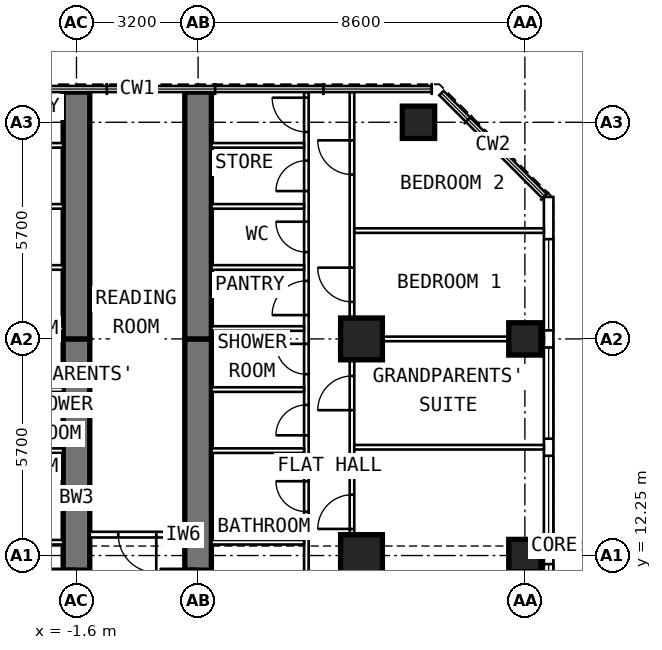
"""IFC4 building model, lengths in metres.
Left out: names, types, materials, properties, quantities, classifications, styles, units other than length and angle.
Written with IfcOpenShell. Run it as: python <this file> out.ifc"""

import sys

from ifc_helpers import new_model, si_unit, direction, frame, frame_2d, origin, origin_2d, place, context, subcontext, project, spatial, rectangle, extrude, element, fill, save


model = new_model("IFC4")
c1 = context("Model", 3, precision=1e-05, world=origin(), true_north=direction((0.0, 1.0)))
c2 = subcontext(c1, "Body", "Model", "MODEL_VIEW")
j1 = project(units=[si_unit("LENGTHUNIT", "METRE"), si_unit("PLANEANGLEUNIT", "RADIAN")], contexts=[c1])
p1 = place(None, origin())
s1 = spatial("IfcSite", under=j1, at=p1, CompositionType="ELEMENT")
p2 = place(p1, origin())
s2 = spatial("IfcBuilding", under=s1, at=p2, CompositionType="ELEMENT")
p3 = place(p2, frame((0.0, 0.0, 249.6)))
s3 = spatial("IfcBuildingStorey", under=s2, at=p3, CompositionType="ELEMENT", Elevation=249.6)
for number, where, z_axis, x_axis in (
    (1, (10.2, 12.25, 0.0), (0.0, 0.0, 1.0), (0.0, 1.0, 0.0)),
    (2, (10.2, 17.95, 0.0), (0.0, 0.0, 1.0), (0.0, 1.0, 0.0)),
    (3, (7.4, 23.65, 0.0), (0.0, 0.0, 1.0), (0.0, 1.0, 0.0)),
):
    element("IfcColumn", number, at=place(p3, frame(where, z_axis=z_axis, x_axis=x_axis)), inside=s3, PredefinedType="COLUMN", context=c2, shape_type="SweptSolid", body=[
        extrude(rectangle(XDim=0.85, YDim=0.85, at=origin_2d()), origin(), (0.0, 0.0, 1.0), 3.6),
    ])
for number, where, z_axis, x_axis in (
    (4, (5.9, 12.25, 0.0), (0.0, 0.0, 1.0), (0.0, 1.0, 0.0)),
    (5, (5.9, 17.95, 0.0), (0.0, 0.0, 1.0), (0.0, 1.0, 0.0)),
):
    element("IfcColumn", number, at=place(p3, frame(where, z_axis=z_axis, x_axis=x_axis)), inside=s3, PredefinedType="COLUMN", context=c2, shape_type="SweptSolid", body=[
        extrude(rectangle(XDim=1.1, YDim=1.1, at=origin_2d()), origin(), (0.0, 0.0, 1.0), 3.6),
    ])
p4 = place(p3, frame((-1.6, 9.6, 0.0), z_axis=(0.0, 0.0, 1.0), x_axis=(0.0, 1.0, 0.0)))
e6 = element("IfcWall", 6, at=p4, inside=s3, PredefinedType="SHEAR", context=c2, shape_type="SweptSolid", body=[
    extrude(rectangle(XDim=8.35, YDim=0.7, at=frame_2d((4.175, 0.0))), origin(), (0.0, 0.0, 1.0), 3.6),
])
p5 = place(p4, frame((1.3, 0.0, 0.0)))
e7 = element("IfcOpeningElement", 7, at=p5, cuts=e6, PredefinedType="OPENING", context=c2, shape_type="SweptSolid", body=[
    extrude(rectangle(XDim=1.0, YDim=2.1, at=frame_2d((0.5, 1.05))), frame((0.0, 0.362, 0.0), z_axis=(0.0, -1.0, 0.0), x_axis=(1.0, 0.0, 0.0)), (0.0, 0.0, 1.0), 0.724),
])
p6 = place(p3, frame((-1.6, 17.95, 0.0), z_axis=(0.0, 0.0, 1.0), x_axis=(0.0, 1.0, 0.0)))
e8 = element("IfcWall", 8, at=p6, inside=s3, PredefinedType="SHEAR", context=c2, shape_type="SweptSolid", body=[
    extrude(rectangle(XDim=6.495, YDim=0.7, at=frame_2d((3.248, 0.0))), origin(), (0.0, 0.0, 1.0), 3.6),
])
p7 = place(p3, frame((1.6, 9.6, 0.0), z_axis=(0.0, 0.0, 1.0), x_axis=(0.0, 1.0, 0.0)))
e9 = element("IfcWall", 9, at=p7, inside=s3, PredefinedType="SHEAR", context=c2, shape_type="SweptSolid", body=[
    extrude(rectangle(XDim=8.35, YDim=0.7, at=frame_2d((4.175, 0.0))), origin(), (0.0, 0.0, 1.0), 3.6),
])
p8 = place(p7, frame((1.3, 0.0, 0.0)))
e10 = element("IfcOpeningElement", 10, at=p8, cuts=e9, PredefinedType="OPENING", context=c2, shape_type="SweptSolid", body=[
    extrude(rectangle(XDim=1.0, YDim=2.1, at=frame_2d((0.5, 1.05))), frame((0.0, 0.362, 0.0), z_axis=(0.0, -1.0, 0.0), x_axis=(1.0, 0.0, 0.0)), (0.0, 0.0, 1.0), 0.724),
])
p9 = place(p3, frame((1.6, 17.95, 0.0), z_axis=(0.0, 0.0, 1.0), x_axis=(0.0, 1.0, 0.0)))
e11 = element("IfcWall", 11, at=p9, inside=s3, PredefinedType="SHEAR", context=c2, shape_type="SweptSolid", body=[
    extrude(rectangle(XDim=6.495, YDim=0.7, at=frame_2d((3.248, 0.0))), origin(), (0.0, 0.0, 1.0), 3.6),
])
p10 = place(p3, frame((10.825, 6.409, 0.0), z_axis=(0.0, 0.0, 1.0), x_axis=(0.0, 1.0, 0.0)))
e12 = element("IfcWall", 12, at=p10, inside=s3, PredefinedType="SOLIDWALL", context=c2, shape_type="SweptSolid", body=[
    extrude(rectangle(XDim=15.276, YDim=0.25, at=frame_2d((7.638, 0.0))), origin(), (0.0, 0.0, 1.0), 3.35),
])
p11 = place(p10, frame((0.366, 0.0, 0.8)))
e13 = element("IfcOpeningElement", 13, at=p11, cuts=e12, PredefinedType="OPENING", context=c2, shape_type="SweptSolid", body=[
    extrude(rectangle(XDim=2.4, YDim=1.8, at=frame_2d((1.2, 0.9))), frame((0.0, 0.137, 0.0), z_axis=(0.0, -1.0, 0.0), x_axis=(1.0, 0.0, 0.0)), (0.0, 0.0, 1.0), 0.274),
])
p12 = place(p10, frame((3.216, 0.0, 0.8)))
e14 = element("IfcOpeningElement", 14, at=p12, cuts=e12, PredefinedType="OPENING", context=c2, shape_type="SweptSolid", body=[
    extrude(rectangle(XDim=2.4, YDim=1.8, at=frame_2d((1.2, 0.9))), frame((0.0, 0.137, 0.0), z_axis=(0.0, -1.0, 0.0), x_axis=(1.0, 0.0, 0.0)), (0.0, 0.0, 1.0), 0.274),
])
p13 = place(p10, frame((6.066, 0.0, 0.8)))
e15 = element("IfcOpeningElement", 15, at=p13, cuts=e12, PredefinedType="OPENING", context=c2, shape_type="SweptSolid", body=[
    extrude(rectangle(XDim=2.4, YDim=1.8, at=frame_2d((1.2, 0.9))), frame((0.0, 0.137, 0.0), z_axis=(0.0, -1.0, 0.0), x_axis=(1.0, 0.0, 0.0)), (0.0, 0.0, 1.0), 0.274),
])
p14 = place(p10, frame((8.916, 0.0, 0.8)))
e16 = element("IfcOpeningElement", 16, at=p14, cuts=e12, PredefinedType="OPENING", context=c2, shape_type="SweptSolid", body=[
    extrude(rectangle(XDim=2.4, YDim=1.8, at=frame_2d((1.2, 0.9))), frame((0.0, 0.137, 0.0), z_axis=(0.0, -1.0, 0.0), x_axis=(1.0, 0.0, 0.0)), (0.0, 0.0, 1.0), 0.274),
])
p15 = place(p10, frame((11.766, 0.0, 0.8)))
e17 = element("IfcOpeningElement", 17, at=p15, cuts=e12, PredefinedType="OPENING", context=c2, shape_type="SweptSolid", body=[
    extrude(rectangle(XDim=2.4, YDim=1.8, at=frame_2d((1.2, 0.9))), frame((0.0, 0.137, 0.0), z_axis=(0.0, -1.0, 0.0), x_axis=(1.0, 0.0, 0.0)), (0.0, 0.0, 1.0), 0.274),
])
p16 = place(p3, frame((-1.95, 12.6, 0.0), z_axis=(0.0, 0.0, 1.0), x_axis=(-1.0, 0.0, 0.0)))
e18 = element("IfcWall", 18, at=p16, inside=s3, PredefinedType="PARTITIONING", context=c2, shape_type="SweptSolid", body=[
    extrude(rectangle(XDim=2.44, YDim=0.12, at=frame_2d((1.22, 0.0))), origin(), (0.0, 0.0, 1.0), 2.45),
])
for number, where, z_axis, x_axis in (
    (19, (-1.95, 15.01, 0.0), (0.0, 0.0, 1.0), (-1.0, 0.0, 0.0)),
    (20, (-1.95, 16.617, 0.0), (0.0, 0.0, 1.0), (-1.0, 0.0, 0.0)),
):
    element("IfcWall", number, at=place(p3, frame(where, z_axis=z_axis, x_axis=x_axis)), inside=s3, PredefinedType="PARTITIONING", context=c2, shape_type="SweptSolid", body=[
        extrude(rectangle(XDim=2.44, YDim=0.12, at=frame_2d((1.22, 0.0))), origin(), (0.0, 0.0, 1.0), 3.35),
    ])
p17 = place(p3, frame((-1.95, 18.223, 0.0), z_axis=(0.0, 0.0, 1.0), x_axis=(-1.0, 0.0, 0.0)))
e21 = element("IfcWall", 21, at=p17, inside=s3, PredefinedType="PARTITIONING", context=c2, shape_type="SweptSolid", body=[
    extrude(rectangle(XDim=2.44, YDim=0.12, at=frame_2d((1.22, 0.0))), origin(), (0.0, 0.0, 1.0), 2.45),
])
for number, where, z_axis, x_axis in (
    (22, (-1.95, 19.83, 0.0), (0.0, 0.0, 1.0), (-1.0, 0.0, 0.0)),
    (23, (-1.95, 21.437, 0.0), (0.0, 0.0, 1.0), (-1.0, 0.0, 0.0)),
    (24, (-1.95, 23.043, 0.0), (0.0, 0.0, 1.0), (-1.0, 0.0, 0.0)),
):
    element("IfcWall", number, at=place(p3, frame(where, z_axis=z_axis, x_axis=x_axis)), inside=s3, PredefinedType="PARTITIONING", context=c2, shape_type="SweptSolid", body=[
        extrude(rectangle(XDim=2.44, YDim=0.12, at=frame_2d((1.22, 0.0))), origin(), (0.0, 0.0, 1.0), 3.35),
    ])
p18 = place(p3, frame((4.45, 9.9, 0.0), z_axis=(0.0, 0.0, 1.0), x_axis=(0.0, 1.0, 0.0)))
e25 = element("IfcWall", 25, at=p18, inside=s3, PredefinedType="PARTITIONING", context=c2, shape_type="SweptSolid", body=[
    extrude(rectangle(XDim=14.545, YDim=0.12, at=frame_2d((7.272, 0.0))), origin(), (0.0, 0.0, 1.0), 3.35),
])
p19 = place(p18, frame((0.95, 0.0, 0.0)))
e26 = element("IfcOpeningElement", 26, at=p19, cuts=e25, PredefinedType="OPENING", context=c2, shape_type="SweptSolid", body=[
    extrude(rectangle(XDim=0.9, YDim=2.1, at=frame_2d((0.45, 1.05))), frame((0.0, 0.072, 0.0), z_axis=(0.0, -1.0, 0.0), x_axis=(1.0, 0.0, 0.0)), (0.0, 0.0, 1.0), 0.144),
])
p20 = place(p18, frame((3.505, 0.0, 0.0)))
e27 = element("IfcOpeningElement", 27, at=p20, cuts=e25, PredefinedType="OPENING", context=c2, shape_type="SweptSolid", body=[
    extrude(rectangle(XDim=0.8, YDim=2.1, at=frame_2d((0.4, 1.05))), frame((0.0, 0.072, 0.0), z_axis=(0.0, -1.0, 0.0), x_axis=(1.0, 0.0, 0.0)), (0.0, 0.0, 1.0), 0.144),
])
p21 = place(p18, frame((5.513, 0.0, 0.0)))
e28 = element("IfcOpeningElement", 28, at=p21, cuts=e25, PredefinedType="OPENING", context=c2, shape_type="SweptSolid", body=[
    extrude(rectangle(XDim=0.8, YDim=2.1, at=frame_2d((0.4, 1.05))), frame((0.0, 0.072, 0.0), z_axis=(0.0, -1.0, 0.0), x_axis=(1.0, 0.0, 0.0)), (0.0, 0.0, 1.0), 0.144),
])
p22 = place(p18, frame((7.12, 0.0, 0.0)))
e29 = element("IfcOpeningElement", 29, at=p22, cuts=e25, PredefinedType="OPENING", context=c2, shape_type="SweptSolid", body=[
    extrude(rectangle(XDim=0.8, YDim=2.1, at=frame_2d((0.4, 1.05))), frame((0.0, 0.072, 0.0), z_axis=(0.0, -1.0, 0.0), x_axis=(1.0, 0.0, 0.0)), (0.0, 0.0, 1.0), 0.144),
])
p23 = place(p18, frame((8.677, 0.0, 0.0)))
e30 = element("IfcOpeningElement", 30, at=p23, cuts=e25, PredefinedType="OPENING", context=c2, shape_type="SweptSolid", body=[
    extrude(rectangle(XDim=0.9, YDim=2.1, at=frame_2d((0.45, 1.05))), frame((0.0, 0.072, 0.0), z_axis=(0.0, -1.0, 0.0), x_axis=(1.0, 0.0, 0.0)), (0.0, 0.0, 1.0), 0.144),
])
p24 = place(p18, frame((10.333, 0.0, 0.0)))
e31 = element("IfcOpeningElement", 31, at=p24, cuts=e25, PredefinedType="OPENING", context=c2, shape_type="SweptSolid", body=[
    extrude(rectangle(XDim=0.8, YDim=2.1, at=frame_2d((0.4, 1.05))), frame((0.0, 0.072, 0.0), z_axis=(0.0, -1.0, 0.0), x_axis=(1.0, 0.0, 0.0)), (0.0, 0.0, 1.0), 0.144),
])
p25 = place(p18, frame((11.94, 0.0, 0.0)))
e32 = element("IfcOpeningElement", 32, at=p25, cuts=e25, PredefinedType="OPENING", context=c2, shape_type="SweptSolid", body=[
    extrude(rectangle(XDim=0.8, YDim=2.1, at=frame_2d((0.4, 1.05))), frame((0.0, 0.072, 0.0), z_axis=(0.0, -1.0, 0.0), x_axis=(1.0, 0.0, 0.0)), (0.0, 0.0, 1.0), 0.144),
])
p26 = place(p18, frame((13.497, 0.0, 0.0)))
e33 = element("IfcOpeningElement", 33, at=p26, cuts=e25, PredefinedType="OPENING", context=c2, shape_type="SweptSolid", body=[
    extrude(rectangle(XDim=0.9, YDim=2.1, at=frame_2d((0.45, 1.05))), frame((0.0, 0.072, 0.0), z_axis=(0.0, -1.0, 0.0), x_axis=(1.0, 0.0, 0.0)), (0.0, 0.0, 1.0), 0.144),
])
p27 = place(p3, frame((5.65, 9.6, 0.0), z_axis=(0.0, 0.0, 1.0), x_axis=(0.0, 1.0, 0.0)))
e34 = element("IfcWall", 34, at=p27, inside=s3, PredefinedType="PARTITIONING", context=c2, shape_type="SweptSolid", body=[
    extrude(rectangle(XDim=14.845, YDim=0.12, at=frame_2d((7.422, 0.0))), origin(), (0.0, 0.0, 1.0), 3.35),
])
p28 = place(p27, frame((3.35, 0.0, 0.0)))
e35 = element("IfcOpeningElement", 35, at=p28, cuts=e34, PredefinedType="OPENING", context=c2, shape_type="SweptSolid", body=[
    extrude(rectangle(XDim=0.9, YDim=2.1, at=frame_2d((0.45, 1.05))), frame((0.0, 0.072, 0.0), z_axis=(0.0, -1.0, 0.0), x_axis=(1.0, 0.0, 0.0)), (0.0, 0.0, 1.0), 0.144),
])
p29 = place(p27, frame((6.475, 0.0, 0.0)))
e36 = element("IfcOpeningElement", 36, at=p29, cuts=e34, PredefinedType="OPENING", context=c2, shape_type="SweptSolid", body=[
    extrude(rectangle(XDim=0.9, YDim=2.1, at=frame_2d((0.45, 1.05))), frame((0.0, 0.072, 0.0), z_axis=(0.0, -1.0, 0.0), x_axis=(1.0, 0.0, 0.0)), (0.0, 0.0, 1.0), 0.144),
])
p30 = place(p27, frame((9.325, 0.0, 0.0)))
e37 = element("IfcOpeningElement", 37, at=p30, cuts=e34, PredefinedType="OPENING", context=c2, shape_type="SweptSolid", body=[
    extrude(rectangle(XDim=0.9, YDim=2.1, at=frame_2d((0.45, 1.05))), frame((0.0, 0.072, 0.0), z_axis=(0.0, -1.0, 0.0), x_axis=(1.0, 0.0, 0.0)), (0.0, 0.0, 1.0), 0.144),
])
p31 = place(p27, frame((12.675, 0.0, 0.0)))
e38 = element("IfcOpeningElement", 38, at=p31, cuts=e34, PredefinedType="OPENING", context=c2, shape_type="SweptSolid", body=[
    extrude(rectangle(XDim=0.9, YDim=2.1, at=frame_2d((0.45, 1.05))), frame((0.0, 0.072, 0.0), z_axis=(0.0, -1.0, 0.0), x_axis=(1.0, 0.0, 0.0)), (0.0, 0.0, 1.0), 0.144),
])
p32 = place(p3, frame((5.71, 15.1, 0.0), z_axis=(0.0, 0.0, 1.0), x_axis=(1.0, 0.0, 0.0)))
e39 = element("IfcWall", 39, at=p32, inside=s3, PredefinedType="PARTITIONING", context=c2, shape_type="SweptSolid", body=[
    extrude(rectangle(XDim=4.99, YDim=0.12, at=frame_2d((2.495, 0.0))), origin(), (0.0, 0.0, 1.0), 3.35),
])
p33 = place(p3, frame((5.71, 17.95, 0.0), z_axis=(0.0, 0.0, 1.0), x_axis=(1.0, 0.0, 0.0)))
e40 = element("IfcWall", 40, at=p33, inside=s3, PredefinedType="PARTITIONING", context=c2, shape_type="SweptSolid", body=[
    extrude(rectangle(XDim=4.99, YDim=0.12, at=frame_2d((2.495, 0.0))), origin(), (0.0, 0.0, 1.0), 2.45),
])
p34 = place(p3, frame((5.71, 20.8, 0.0), z_axis=(0.0, 0.0, 1.0), x_axis=(1.0, 0.0, 0.0)))
e41 = element("IfcWall", 41, at=p34, inside=s3, PredefinedType="PARTITIONING", context=c2, shape_type="SweptSolid", body=[
    extrude(rectangle(XDim=4.99, YDim=0.12, at=frame_2d((2.495, 0.0))), origin(), (0.0, 0.0, 1.0), 3.35),
])
p35 = place(p3, frame((1.95, 12.6, 0.0), z_axis=(0.0, 0.0, 1.0), x_axis=(1.0, 0.0, 0.0)))
e42 = element("IfcWall", 42, at=p35, inside=s3, PredefinedType="PARTITIONING", context=c2, shape_type="SweptSolid", body=[
    extrude(rectangle(XDim=2.44, YDim=0.12, at=frame_2d((1.22, 0.0))), origin(), (0.0, 0.0, 1.0), 2.45),
])
for number, where, z_axis, x_axis in (
    (43, (1.95, 15.01, 0.0), (0.0, 0.0, 1.0), (1.0, 0.0, 0.0)),
    (44, (1.95, 16.617, 0.0), (0.0, 0.0, 1.0), (1.0, 0.0, 0.0)),
):
    element("IfcWall", number, at=place(p3, frame(where, z_axis=z_axis, x_axis=x_axis)), inside=s3, PredefinedType="PARTITIONING", context=c2, shape_type="SweptSolid", body=[
        extrude(rectangle(XDim=2.44, YDim=0.12, at=frame_2d((1.22, 0.0))), origin(), (0.0, 0.0, 1.0), 3.35),
    ])
p36 = place(p3, frame((1.95, 18.223, 0.0), z_axis=(0.0, 0.0, 1.0), x_axis=(1.0, 0.0, 0.0)))
e45 = element("IfcWall", 45, at=p36, inside=s3, PredefinedType="PARTITIONING", context=c2, shape_type="SweptSolid", body=[
    extrude(rectangle(XDim=2.44, YDim=0.12, at=frame_2d((1.22, 0.0))), origin(), (0.0, 0.0, 1.0), 2.45),
])
for number, where, z_axis, x_axis in (
    (46, (1.95, 19.83, 0.0), (0.0, 0.0, 1.0), (1.0, 0.0, 0.0)),
    (47, (1.95, 21.437, 0.0), (0.0, 0.0, 1.0), (1.0, 0.0, 0.0)),
    (48, (1.95, 23.043, 0.0), (0.0, 0.0, 1.0), (1.0, 0.0, 0.0)),
):
    element("IfcWall", number, at=place(p3, frame(where, z_axis=z_axis, x_axis=x_axis)), inside=s3, PredefinedType="PARTITIONING", context=c2, shape_type="SweptSolid", body=[
        extrude(rectangle(XDim=2.44, YDim=0.12, at=frame_2d((1.22, 0.0))), origin(), (0.0, 0.0, 1.0), 3.35),
    ])
p37 = place(p3, frame((1.25, 12.8, 0.0), z_axis=(0.0, 0.0, 1.0), x_axis=(-1.0, 0.0, 0.0)))
e49 = element("IfcWall", 49, at=p37, inside=s3, PredefinedType="PARTITIONING", context=c2, shape_type="SweptSolid", body=[
    extrude(rectangle(XDim=2.5, YDim=0.15, at=frame_2d((1.25, 0.0))), origin(), (0.0, 0.0, 1.0), 3.35),
])
p38 = place(p37, frame((0.75, 0.0, 0.0)))
e50 = element("IfcOpeningElement", 50, at=p38, cuts=e49, PredefinedType="OPENING", context=c2, shape_type="SweptSolid", body=[
    extrude(rectangle(XDim=1.0, YDim=2.1, at=frame_2d((0.5, 1.05))), frame((0.0, 0.087, 0.0), z_axis=(0.0, -1.0, 0.0), x_axis=(1.0, 0.0, 0.0)), (0.0, 0.0, 1.0), 0.174),
])
p39 = place(p12, origin())
e51 = element("IfcWindow", 51, at=p39, inside=s3, PartitioningType="SINGLE_PANEL", PredefinedType="WINDOW", context=c2, shape_type="SweptSolid", body=[
    extrude(rectangle(XDim=2.4, YDim=1.8, at=frame_2d((1.2, 0.9))), frame((0.0, 0.03, 0.0), z_axis=(0.0, -1.0, 0.0), x_axis=(1.0, 0.0, 0.0)), (0.0, 0.0, 1.0), 0.06),
])
fill(e14, e51)
p40 = place(p13, origin())
e52 = element("IfcWindow", 52, at=p40, inside=s3, PartitioningType="SINGLE_PANEL", PredefinedType="WINDOW", context=c2, shape_type="SweptSolid", body=[
    extrude(rectangle(XDim=2.4, YDim=1.8, at=frame_2d((1.2, 0.9))), frame((0.0, 0.03, 0.0), z_axis=(0.0, -1.0, 0.0), x_axis=(1.0, 0.0, 0.0)), (0.0, 0.0, 1.0), 0.06),
])
fill(e15, e52)
p41 = place(p14, origin())
e53 = element("IfcWindow", 53, at=p41, inside=s3, PartitioningType="SINGLE_PANEL", PredefinedType="WINDOW", context=c2, shape_type="SweptSolid", body=[
    extrude(rectangle(XDim=2.4, YDim=1.8, at=frame_2d((1.2, 0.9))), frame((0.0, 0.03, 0.0), z_axis=(0.0, -1.0, 0.0), x_axis=(1.0, 0.0, 0.0)), (0.0, 0.0, 1.0), 0.06),
])
fill(e16, e53)
p42 = place(p15, origin())
e54 = element("IfcWindow", 54, at=p42, inside=s3, PartitioningType="SINGLE_PANEL", PredefinedType="WINDOW", context=c2, shape_type="SweptSolid", body=[
    extrude(rectangle(XDim=2.4, YDim=1.8, at=frame_2d((1.2, 0.9))), frame((0.0, 0.03, 0.0), z_axis=(0.0, -1.0, 0.0), x_axis=(1.0, 0.0, 0.0)), (0.0, 0.0, 1.0), 0.06),
])
fill(e17, e54)
p43 = place(p5, origin())
e55 = element("IfcDoor", 55, at=p43, inside=s3, OperationType="SINGLE_SWING_RIGHT", PredefinedType="DOOR", context=c2, shape_type="SweptSolid", body=[
    extrude(rectangle(XDim=1.0, YDim=2.1, at=frame_2d((0.5, 1.05))), frame((0.0, 0.1, 0.0), z_axis=(0.0, -1.0, 0.0), x_axis=(1.0, 0.0, 0.0)), (0.0, 0.0, 1.0), 0.2),
])
fill(e7, e55)
p44 = place(p8, origin())
e56 = element("IfcDoor", 56, at=p44, inside=s3, OperationType="SINGLE_SWING_RIGHT", PredefinedType="DOOR", context=c2, shape_type="SweptSolid", body=[
    extrude(rectangle(XDim=1.0, YDim=2.1, at=frame_2d((0.5, 1.05))), frame((0.0, 0.1, 0.0), z_axis=(0.0, -1.0, 0.0), x_axis=(1.0, 0.0, 0.0)), (0.0, 0.0, 1.0), 0.2),
])
fill(e10, e56)
p45 = place(p28, origin())
e57 = element("IfcDoor", 57, at=p45, inside=s3, OperationType="SINGLE_SWING_LEFT", PredefinedType="DOOR", context=c2, shape_type="SweptSolid", body=[
    extrude(rectangle(XDim=0.9, YDim=2.1, at=frame_2d((0.45, 1.05))), frame((0.0, 0.025, 0.0), z_axis=(0.0, -1.0, 0.0), x_axis=(1.0, 0.0, 0.0)), (0.0, 0.0, 1.0), 0.05),
])
fill(e35, e57)
p46 = place(p29, origin())
e58 = element("IfcDoor", 58, at=p46, inside=s3, OperationType="SINGLE_SWING_LEFT", PredefinedType="DOOR", context=c2, shape_type="SweptSolid", body=[
    extrude(rectangle(XDim=0.9, YDim=2.1, at=frame_2d((0.45, 1.05))), frame((0.0, 0.025, 0.0), z_axis=(0.0, -1.0, 0.0), x_axis=(1.0, 0.0, 0.0)), (0.0, 0.0, 1.0), 0.05),
])
fill(e36, e58)
p47 = place(p30, origin())
e59 = element("IfcDoor", 59, at=p47, inside=s3, OperationType="SINGLE_SWING_RIGHT", PredefinedType="DOOR", context=c2, shape_type="SweptSolid", body=[
    extrude(rectangle(XDim=0.9, YDim=2.1, at=frame_2d((0.45, 1.05))), frame((0.0, 0.025, 0.0), z_axis=(0.0, -1.0, 0.0), x_axis=(1.0, 0.0, 0.0)), (0.0, 0.0, 1.0), 0.05),
])
fill(e37, e59)
p48 = place(p31, origin())
e60 = element("IfcDoor", 60, at=p48, inside=s3, OperationType="SINGLE_SWING_RIGHT", PredefinedType="DOOR", context=c2, shape_type="SweptSolid", body=[
    extrude(rectangle(XDim=0.9, YDim=2.1, at=frame_2d((0.45, 1.05))), frame((0.0, 0.025, 0.0), z_axis=(0.0, -1.0, 0.0), x_axis=(1.0, 0.0, 0.0)), (0.0, 0.0, 1.0), 0.05),
])
fill(e38, e60)
p49 = place(p20, origin())
e61 = element("IfcDoor", 61, at=p49, inside=s3, OperationType="SINGLE_SWING_RIGHT", PredefinedType="DOOR", context=c2, shape_type="SweptSolid", body=[
    extrude(rectangle(XDim=0.8, YDim=2.1, at=frame_2d((0.4, 1.05))), frame((0.0, 0.025, 0.0), z_axis=(0.0, -1.0, 0.0), x_axis=(1.0, 0.0, 0.0)), (0.0, 0.0, 1.0), 0.05),
])
fill(e27, e61)
p50 = place(p21, origin())
e62 = element("IfcDoor", 62, at=p50, inside=s3, OperationType="SINGLE_SWING_LEFT", PredefinedType="DOOR", context=c2, shape_type="SweptSolid", body=[
    extrude(rectangle(XDim=0.8, YDim=2.1, at=frame_2d((0.4, 1.05))), frame((0.0, 0.025, 0.0), z_axis=(0.0, -1.0, 0.0), x_axis=(1.0, 0.0, 0.0)), (0.0, 0.0, 1.0), 0.05),
])
fill(e28, e62)
p51 = place(p22, origin())
e63 = element("IfcDoor", 63, at=p51, inside=s3, OperationType="SINGLE_SWING_RIGHT", PredefinedType="DOOR", context=c2, shape_type="SweptSolid", body=[
    extrude(rectangle(XDim=0.8, YDim=2.1, at=frame_2d((0.4, 1.05))), frame((0.0, 0.025, 0.0), z_axis=(0.0, -1.0, 0.0), x_axis=(1.0, 0.0, 0.0)), (0.0, 0.0, 1.0), 0.05),
])
fill(e29, e63)
p52 = place(p23, origin())
e64 = element("IfcDoor", 64, at=p52, inside=s3, OperationType="SINGLE_SWING_LEFT", PredefinedType="DOOR", context=c2, shape_type="SweptSolid", body=[
    extrude(rectangle(XDim=0.9, YDim=2.1, at=frame_2d((0.45, 1.05))), frame((0.0, 0.025, 0.0), z_axis=(0.0, -1.0, 0.0), x_axis=(1.0, 0.0, 0.0)), (0.0, 0.0, 1.0), 0.05),
])
fill(e30, e64)
p53 = place(p24, origin())
e65 = element("IfcDoor", 65, at=p53, inside=s3, OperationType="SINGLE_SWING_RIGHT", PredefinedType="DOOR", context=c2, shape_type="SweptSolid", body=[
    extrude(rectangle(XDim=0.8, YDim=2.1, at=frame_2d((0.4, 1.05))), frame((0.0, 0.025, 0.0), z_axis=(0.0, -1.0, 0.0), x_axis=(1.0, 0.0, 0.0)), (0.0, 0.0, 1.0), 0.05),
])
fill(e31, e65)
p54 = place(p25, origin())
e66 = element("IfcDoor", 66, at=p54, inside=s3, OperationType="SINGLE_SWING_LEFT", PredefinedType="DOOR", context=c2, shape_type="SweptSolid", body=[
    extrude(rectangle(XDim=0.8, YDim=2.1, at=frame_2d((0.4, 1.05))), frame((0.0, 0.025, 0.0), z_axis=(0.0, -1.0, 0.0), x_axis=(1.0, 0.0, 0.0)), (0.0, 0.0, 1.0), 0.05),
])
fill(e32, e66)
p55 = place(p26, origin())
e67 = element("IfcDoor", 67, at=p55, inside=s3, OperationType="SINGLE_SWING_RIGHT", PredefinedType="DOOR", context=c2, shape_type="SweptSolid", body=[
    extrude(rectangle(XDim=0.9, YDim=2.1, at=frame_2d((0.45, 1.05))), frame((0.0, 0.025, 0.0), z_axis=(0.0, -1.0, 0.0), x_axis=(1.0, 0.0, 0.0)), (0.0, 0.0, 1.0), 0.05),
])
fill(e33, e67)
p56 = place(p38, origin())
e68 = element("IfcDoor", 68, at=p56, inside=s3, OperationType="SINGLE_SWING_LEFT", PredefinedType="DOOR", context=c2, shape_type="SweptSolid", body=[
    extrude(rectangle(XDim=1.0, YDim=2.1, at=frame_2d((0.5, 1.05))), frame((0.0, 0.025, 0.0), z_axis=(0.0, -1.0, 0.0), x_axis=(1.0, 0.0, 0.0)), (0.0, 0.0, 1.0), 0.05),
])
fill(e50, e68)
save(model, sys.argv[1])
